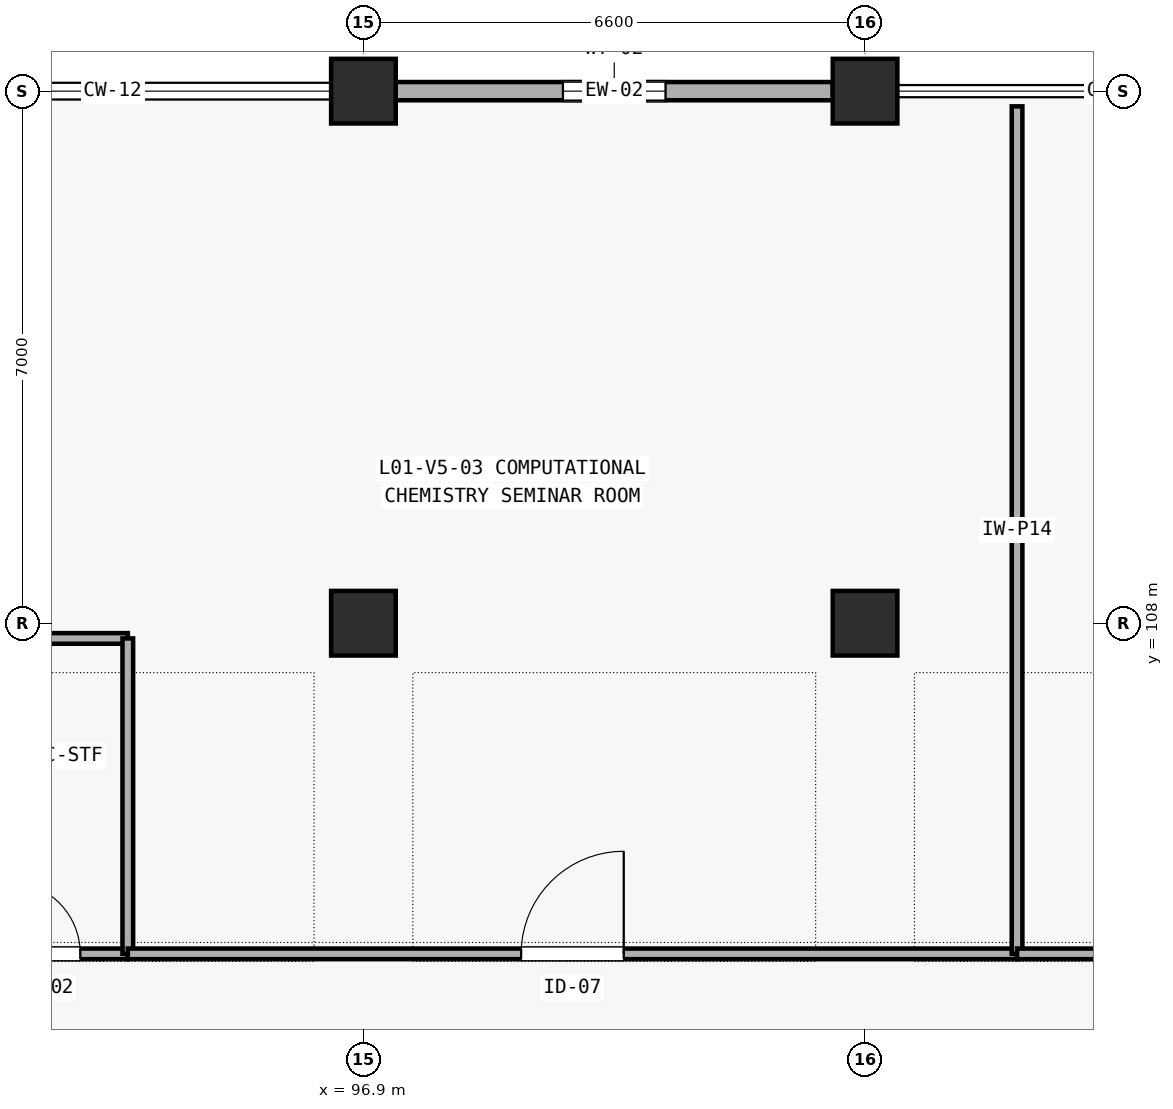
"""IFC4 building model, lengths in metres.
Left out: names, types, materials, properties, quantities, classifications, styles, units other than length and angle.
Written with IfcOpenShell. Run it as: python <this file> out.ifc"""

import sys

from ifc_helpers import new_model, si_unit, direction, frame, frame_2d, origin, origin_2d, place, context, subcontext, project, spatial, rectangle, extrude, element, fill, save


model = new_model("IFC4")
c1 = context("Model", 3, precision=1e-05, world=origin(), true_north=direction((0.0, 1.0)))
c2 = subcontext(c1, "Body", "Model", "MODEL_VIEW")
j1 = project(units=[si_unit("LENGTHUNIT", "METRE"), si_unit("PLANEANGLEUNIT", "RADIAN")], contexts=[c1])
p1 = place(None, origin())
s1 = spatial("IfcSite", under=j1, at=p1, CompositionType="ELEMENT")
p2 = place(p1, origin())
s2 = spatial("IfcBuilding", under=s1, at=p2, CompositionType="ELEMENT")
p3 = place(p2, frame((0.0, 0.0, 4.2)))
s3 = spatial("IfcBuildingStorey", under=s2, at=p3, CompositionType="ELEMENT", Elevation=4.2)
for number, where, z_axis, x_axis in (
    (1, (96.9, 108.0, 0.0), (0.0, 0.0, 1.0), (1.0, 0.0, 0.0)),
    (2, (96.9, 115.0, 0.0), (0.0, 0.0, 1.0), (1.0, 0.0, 0.0)),
    (3, (103.5, 108.0, 0.0), (0.0, 0.0, 1.0), (1.0, 0.0, 0.0)),
    (4, (103.5, 115.0, 0.0), (0.0, 0.0, 1.0), (1.0, 0.0, 0.0)),
):
    element("IfcColumn", number, at=place(p3, frame(where, z_axis=z_axis, x_axis=x_axis)), inside=s3, PredefinedType="COLUMN", context=c2, shape_type="SweptSolid", body=[
        extrude(rectangle(XDim=0.85, YDim=0.85, at=origin_2d()), origin(), (0.0, 0.0, 1.0), 4.2),
    ])
p4 = place(p3, frame((97.325, 115.0, 0.0), z_axis=(0.0, 0.0, 1.0), x_axis=(1.0, 0.0, 0.0)))
e5 = element("IfcWall", 5, at=p4, inside=s3, PredefinedType="SOLIDWALL", context=c2, shape_type="SweptSolid", body=[
    extrude(rectangle(XDim=5.75, YDim=0.24, at=frame_2d((2.875, 0.0))), origin(), (0.0, 0.0, 1.0), 3.365),
])
p5 = place(p4, frame((2.2, 0.0, 0.85)))
e6 = element("IfcOpeningElement", 6, at=p5, cuts=e5, PredefinedType="OPENING", context=c2, shape_type="SweptSolid", body=[
    extrude(rectangle(XDim=1.35, YDim=1.35, at=frame_2d((0.675, 0.675))), frame((0.0, 0.13, 0.0), z_axis=(0.0, -1.0, 0.0), x_axis=(1.0, 0.0, 0.0)), (0.0, 0.0, 1.0), 0.26),
])
p6 = place(p3, frame((91.6, 103.65, 0.0), z_axis=(0.0, 0.0, 1.0), x_axis=(1.0, 0.0, 0.0)))
e7 = element("IfcWall", 7, at=p6, inside=s3, PredefinedType="PLUMBINGWALL", context=c2, shape_type="SweptSolid", body=[
    extrude(rectangle(XDim=2.2, YDim=0.14, at=frame_2d((1.1, 0.0))), origin(), (0.0, 0.0, 1.0), 3.9),
])
p7 = place(p6, frame((0.625, 0.0, 0.0)))
e8 = element("IfcOpeningElement", 8, at=p7, cuts=e7, PredefinedType="OPENING", context=c2, shape_type="SweptSolid", body=[
    extrude(rectangle(XDim=0.95, YDim=2.1, at=frame_2d((0.475, 1.05))), frame((0.0, 0.08, 0.0), z_axis=(0.0, -1.0, 0.0), x_axis=(1.0, 0.0, 0.0)), (0.0, 0.0, 1.0), 0.16),
])
p8 = place(p3, frame((91.6, 107.8, 0.0), z_axis=(0.0, 0.0, 1.0), x_axis=(1.0, 0.0, 0.0)))
e9 = element("IfcWall", 9, at=p8, inside=s3, PredefinedType="PLUMBINGWALL", context=c2, shape_type="SweptSolid", body=[
    extrude(rectangle(XDim=2.2, YDim=0.14, at=frame_2d((1.1, 0.0))), origin(), (0.0, 0.0, 1.0), 3.285),
])
p9 = place(p3, frame((93.8, 103.65, 0.0), z_axis=(0.0, 0.0, 1.0), x_axis=(0.0, 1.0, 0.0)))
e10 = element("IfcWall", 10, at=p9, inside=s3, PredefinedType="PLUMBINGWALL", context=c2, shape_type="SweptSolid", body=[
    extrude(rectangle(XDim=4.15, YDim=0.14, at=frame_2d((2.075, 0.0))), origin(), (0.0, 0.0, 1.0), 3.9),
])
p10 = place(p3, frame((93.8, 103.65, 0.0), z_axis=(0.0, 0.0, 1.0), x_axis=(1.0, 0.0, 0.0)))
e11 = element("IfcWall", 11, at=p10, inside=s3, PredefinedType="PLUMBINGWALL", context=c2, shape_type="SweptSolid", body=[
    extrude(rectangle(XDim=11.7, YDim=0.14, at=frame_2d((5.85, 0.0))), origin(), (0.0, 0.0, 1.0), 3.9),
])
p11 = place(p10, frame((5.175, 0.0, 0.0)))
e12 = element("IfcOpeningElement", 12, at=p11, cuts=e11, PredefinedType="OPENING", context=c2, shape_type="SweptSolid", body=[
    extrude(rectangle(XDim=1.35, YDim=2.2, at=frame_2d((0.675, 1.1))), frame((0.0, 0.08, 0.0), z_axis=(0.0, -1.0, 0.0), x_axis=(1.0, 0.0, 0.0)), (0.0, 0.0, 1.0), 0.16),
])
p12 = place(p3, frame((105.5, 103.65, 0.0), z_axis=(0.0, 0.0, 1.0), x_axis=(0.0, 1.0, 0.0)))
e13 = element("IfcWall", 13, at=p12, inside=s3, PredefinedType="PLUMBINGWALL", context=c2, shape_type="SweptSolid", body=[
    extrude(rectangle(XDim=11.15, YDim=0.14, at=frame_2d((5.575, 0.0))), origin(), (0.0, 0.0, 1.0), 3.594),
])
p13 = place(p3, frame((105.5, 103.65, 0.0), z_axis=(0.0, 0.0, 1.0), x_axis=(1.0, 0.0, 0.0)))
e14 = element("IfcWall", 14, at=p13, inside=s3, PredefinedType="PLUMBINGWALL", context=c2, shape_type="SweptSolid", body=[
    extrude(rectangle(XDim=11.0, YDim=0.14, at=frame_2d((5.5, 0.0))), origin(), (0.0, 0.0, 1.0), 3.9),
])
p14 = place(p13, frame((4.775, 0.0, 0.0)))
e15 = element("IfcOpeningElement", 15, at=p14, cuts=e14, PredefinedType="OPENING", context=c2, shape_type="SweptSolid", body=[
    extrude(rectangle(XDim=1.45, YDim=2.2, at=frame_2d((0.725, 1.1))), frame((0.0, 0.08, 0.0), z_axis=(0.0, -1.0, 0.0), x_axis=(1.0, 0.0, 0.0)), (0.0, 0.0, 1.0), 0.16),
])
p15 = place(p5, origin())
e16 = element("IfcWindow", 16, at=p15, inside=s3, PartitioningType="SINGLE_PANEL", PredefinedType="WINDOW", context=c2, shape_type="SweptSolid", body=[
    extrude(rectangle(XDim=1.35, YDim=1.35, at=frame_2d((0.675, 0.675))), frame((0.0, 0.03, 0.0), z_axis=(0.0, -1.0, 0.0), x_axis=(1.0, 0.0, 0.0)), (0.0, 0.0, 1.0), 0.06),
])
fill(e6, e16)
p16 = place(p7, origin())
e17 = element("IfcDoor", 17, at=p16, inside=s3, OperationType="SINGLE_SWING_LEFT", PredefinedType="DOOR", context=c2, shape_type="SweptSolid", body=[
    extrude(rectangle(XDim=0.95, YDim=2.1, at=frame_2d((0.475, 1.05))), frame((0.0, 0.025, 0.0), z_axis=(0.0, -1.0, 0.0), x_axis=(1.0, 0.0, 0.0)), (0.0, 0.0, 1.0), 0.05),
])
fill(e8, e17)
p17 = place(p11, origin())
e18 = element("IfcDoor", 18, at=p17, inside=s3, OperationType="SINGLE_SWING_RIGHT", PredefinedType="DOOR", context=c2, shape_type="SweptSolid", body=[
    extrude(rectangle(XDim=1.35, YDim=2.2, at=frame_2d((0.675, 1.1))), frame((0.0, 0.025, 0.0), z_axis=(0.0, -1.0, 0.0), x_axis=(1.0, 0.0, 0.0)), (0.0, 0.0, 1.0), 0.05),
])
fill(e12, e18)
save(model, sys.argv[1])
